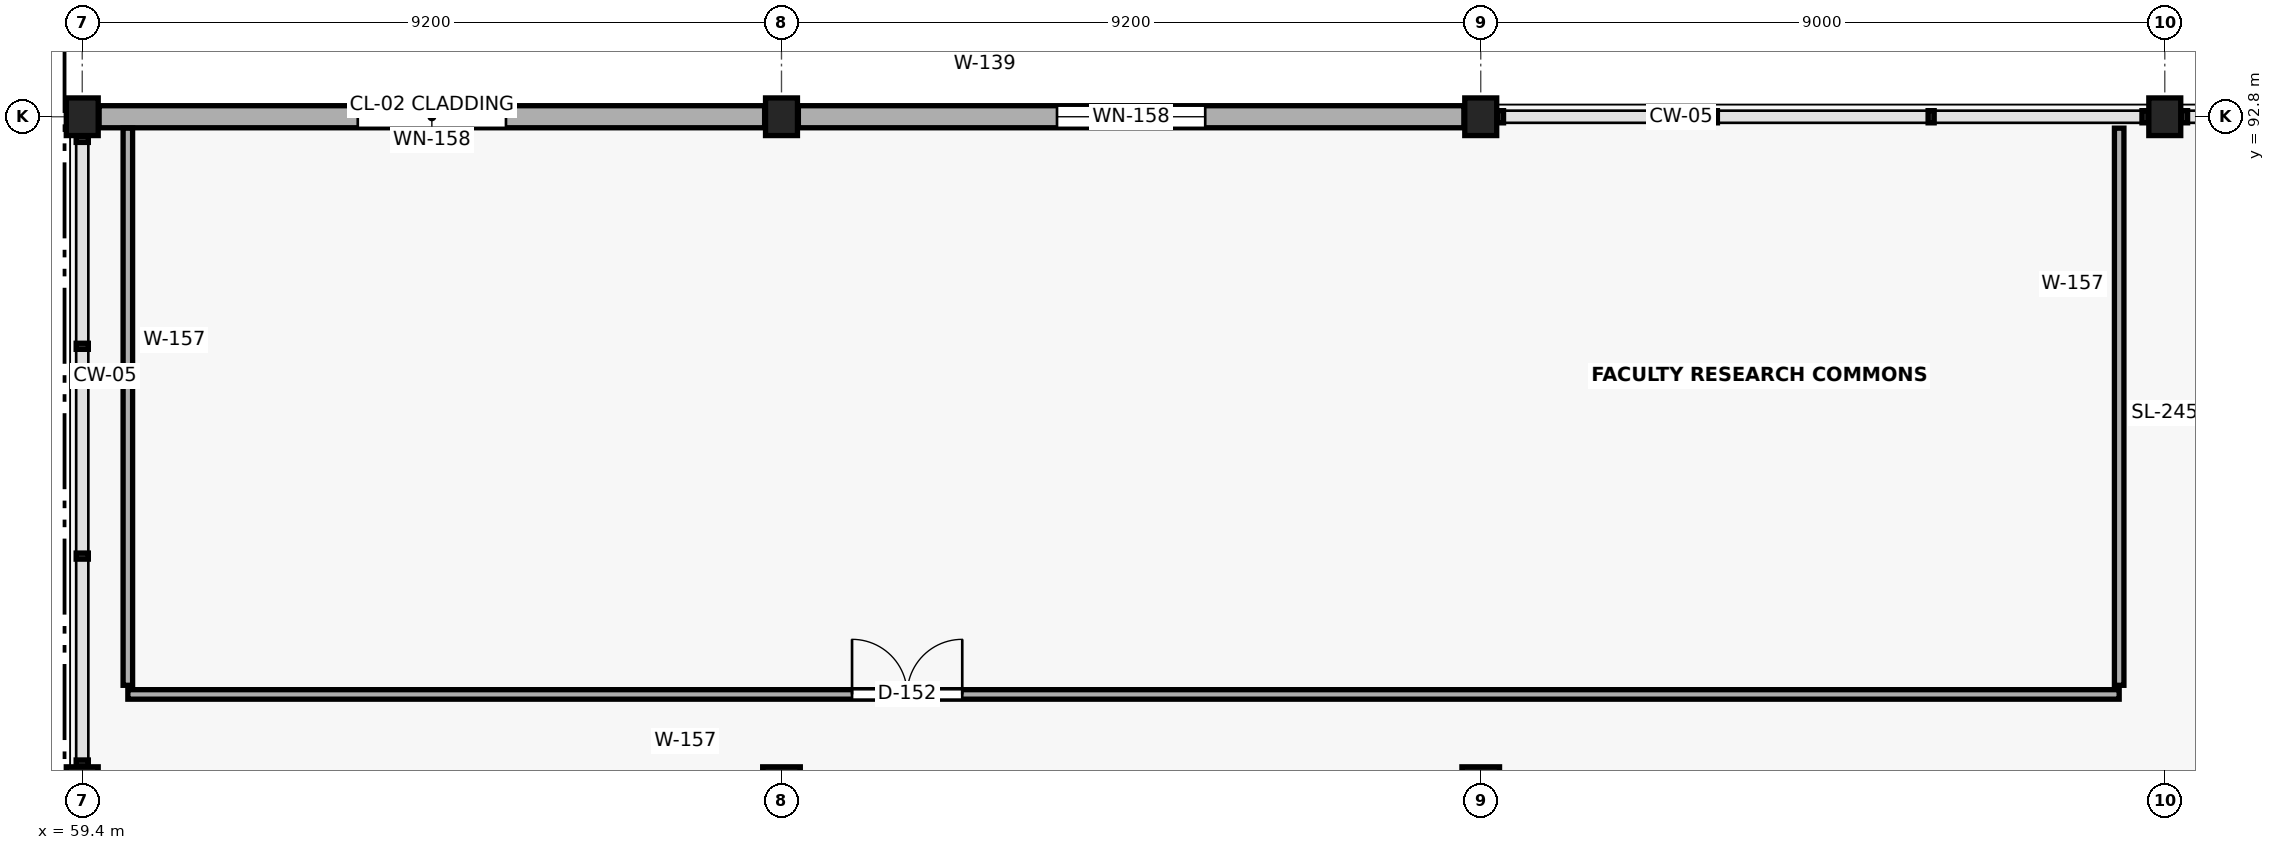
"""IFC4 building model, lengths in metres.
Left out: names, types, materials, properties, quantities, classifications, styles, units other than length and angle.
Written with IfcOpenShell. Run it as: python <this file> out.ifc"""

import sys

from ifc_helpers import new_model, si_unit, direction, frame, frame_2d, origin, origin_2d, place, context, subcontext, project, spatial, rectangle, extrude, element, fill, save


model = new_model("IFC4")
c1 = context("Model", 3, precision=1e-05, world=origin(), true_north=direction((0.0, 1.0)))
c2 = subcontext(c1, "Body", "Model", "MODEL_VIEW")
j1 = project(units=[si_unit("LENGTHUNIT", "METRE"), si_unit("PLANEANGLEUNIT", "RADIAN")], contexts=[c1])
p1 = place(None, origin())
s1 = spatial("IfcSite", under=j1, at=p1, CompositionType="ELEMENT")
p2 = place(p1, origin())
s2 = spatial("IfcBuilding", under=s1, at=p2, CompositionType="ELEMENT")
p3 = place(p2, frame((0.0, 0.0, 14.4)))
s3 = spatial("IfcBuildingStorey", under=s2, at=p3, CompositionType="ELEMENT", Elevation=14.4)
for number, where, z_axis, x_axis in (
    (1, (59.4, 84.0, 0.0), (0.0, 0.0, 1.0), (1.0, 0.0, 0.0)),
    (2, (59.4, 92.8, 0.0), (0.0, 0.0, 1.0), (1.0, 0.0, 0.0)),
):
    element("IfcColumn", number, at=place(p3, frame(where, z_axis=z_axis, x_axis=x_axis)), inside=s3, PredefinedType="COLUMN", context=c2, shape_type="SweptSolid", body=[
        extrude(rectangle(XDim=0.42, YDim=0.495, at=origin_2d()), origin(), (0.0, 0.0, 1.0), 3.9),
    ])
p4 = place(p3, frame((68.6, 84.0, 0.0), z_axis=(0.0, 0.0, 1.0), x_axis=(1.0, 0.0, 0.0)))
e3 = element("IfcColumn", 3, at=p4, inside=s3, PredefinedType="COLUMN", context=c2, shape_type="SweptSolid", body=[
    extrude(rectangle(XDim=0.495, YDim=0.495, at=origin_2d()), origin(), (0.0, 0.0, 1.0), 3.9),
])
p5 = place(p3, frame((68.6, 92.8, 0.0), z_axis=(0.0, 0.0, 1.0), x_axis=(1.0, 0.0, 0.0)))
e4 = element("IfcColumn", 4, at=p5, inside=s3, PredefinedType="COLUMN", context=c2, shape_type="SweptSolid", body=[
    extrude(rectangle(XDim=0.42, YDim=0.495, at=origin_2d()), origin(), (0.0, 0.0, 1.0), 3.9),
])
p6 = place(p3, frame((77.8, 84.0, 0.0), z_axis=(0.0, 0.0, 1.0), x_axis=(1.0, 0.0, 0.0)))
e5 = element("IfcColumn", 5, at=p6, inside=s3, PredefinedType="COLUMN", context=c2, shape_type="SweptSolid", body=[
    extrude(rectangle(XDim=0.495, YDim=0.495, at=origin_2d()), origin(), (0.0, 0.0, 1.0), 3.9),
])
for number, where, z_axis, x_axis in (
    (6, (77.8, 92.8, 0.0), (0.0, 0.0, 1.0), (1.0, 0.0, 0.0)),
    (7, (86.8, 92.8, 0.0), (0.0, 0.0, 1.0), (1.0, 0.0, 0.0)),
):
    element("IfcColumn", number, at=place(p3, frame(where, z_axis=z_axis, x_axis=x_axis)), inside=s3, PredefinedType="COLUMN", context=c2, shape_type="SweptSolid", body=[
        extrude(rectangle(XDim=0.42, YDim=0.495, at=origin_2d()), origin(), (0.0, 0.0, 1.0), 3.9),
    ])
p7 = place(p3, frame((59.622, 92.8, 0.0), z_axis=(0.0, 0.0, 1.0), x_axis=(1.0, 0.0, 0.0)))
e8 = element("IfcWall", 8, at=p7, inside=s3, PredefinedType="SOLIDWALL", context=c2, shape_type="SweptSolid", body=[
    extrude(rectangle(XDim=8.756, YDim=0.29, at=frame_2d((4.378, 0.0))), origin(), (0.0, 0.0, 1.0), 2.855),
])
p8 = place(p7, frame((3.403, 0.0, 0.85)))
e9 = element("IfcOpeningElement", 9, at=p8, cuts=e8, PredefinedType="OPENING", context=c2, shape_type="SweptSolid", body=[
    extrude(rectangle(XDim=1.95, YDim=1.9, at=frame_2d((0.975, 0.95))), frame((0.0, 0.157, 0.0), z_axis=(0.0, -1.0, 0.0), x_axis=(1.0, 0.0, 0.0)), (0.0, 0.0, 1.0), 0.314),
])
p9 = place(p3, frame((68.822, 92.8, 0.0), z_axis=(0.0, 0.0, 1.0), x_axis=(1.0, 0.0, 0.0)))
e10 = element("IfcWall", 10, at=p9, inside=s3, PredefinedType="SOLIDWALL", context=c2, shape_type="SweptSolid", body=[
    extrude(rectangle(XDim=8.756, YDim=0.29, at=frame_2d((4.378, 0.0))), origin(), (0.0, 0.0, 1.0), 2.855),
])
p10 = place(p9, frame((3.403, 0.0, 0.85)))
e11 = element("IfcOpeningElement", 11, at=p10, cuts=e10, PredefinedType="OPENING", context=c2, shape_type="SweptSolid", body=[
    extrude(rectangle(XDim=1.95, YDim=1.9, at=frame_2d((0.975, 0.95))), frame((0.0, 0.157, 0.0), z_axis=(0.0, -1.0, 0.0), x_axis=(1.0, 0.0, 0.0)), (0.0, 0.0, 1.0), 0.314),
])
p11 = place(p3, frame((60.0, 85.2, 0.0), z_axis=(0.0, 0.0, 1.0), x_axis=(1.0, 0.0, 0.0)))
e12 = element("IfcWall", 12, at=p11, inside=s3, PredefinedType="PARTITIONING", context=c2, shape_type="SweptSolid", body=[
    extrude(rectangle(XDim=26.2, YDim=0.125, at=frame_2d((13.1, 0.0))), origin(), (0.0, 0.0, 1.0), 3.655),
])
p12 = place(p11, frame((9.528, 0.0, 0.0)))
e13 = element("IfcOpeningElement", 13, at=p12, cuts=e12, PredefinedType="OPENING", context=c2, shape_type="SweptSolid", body=[
    extrude(rectangle(XDim=1.45, YDim=2.35, at=frame_2d((0.725, 1.175))), frame((0.0, 0.074, 0.0), z_axis=(0.0, -1.0, 0.0), x_axis=(1.0, 0.0, 0.0)), (0.0, 0.0, 1.0), 0.149),
])
for number, where, z_axis, x_axis in (
    (14, (86.2, 85.32, 0.0), (0.0, 0.0, 1.0), (0.0, 1.0, 0.0)),
    (15, (60.0, 92.65, 0.0), (0.0, 0.0, 1.0), (0.0, -1.0, 0.0)),
):
    element("IfcWall", number, at=place(p3, frame(where, z_axis=z_axis, x_axis=x_axis)), inside=s3, PredefinedType="PARTITIONING", context=c2, shape_type="SweptSolid", body=[
        extrude(rectangle(XDim=7.33, YDim=0.125, at=frame_2d((3.665, 0.0))), origin(), (0.0, 0.0, 1.0), 3.655),
    ])
p13 = place(p8, origin())
e16 = element("IfcWindow", 16, at=p13, inside=s3, PartitioningType="SINGLE_PANEL", PredefinedType="WINDOW", context=c2, shape_type="SweptSolid", body=[
    extrude(rectangle(XDim=1.95, YDim=1.9, at=frame_2d((0.975, 0.95))), frame((0.0, 0.03, 0.0), z_axis=(0.0, -1.0, 0.0), x_axis=(1.0, 0.0, 0.0)), (0.0, 0.0, 1.0), 0.06),
])
fill(e9, e16)
p14 = place(p10, origin())
e17 = element("IfcWindow", 17, at=p14, inside=s3, PartitioningType="SINGLE_PANEL", PredefinedType="WINDOW", context=c2, shape_type="SweptSolid", body=[
    extrude(rectangle(XDim=1.95, YDim=1.9, at=frame_2d((0.975, 0.95))), frame((0.0, 0.03, 0.0), z_axis=(0.0, -1.0, 0.0), x_axis=(1.0, 0.0, 0.0)), (0.0, 0.0, 1.0), 0.06),
])
fill(e11, e17)
p15 = place(p12, origin())
e18 = element("IfcDoor", 18, at=p15, inside=s3, OperationType="DOUBLE_DOOR_SINGLE_SWING", PredefinedType="DOOR", context=c2, shape_type="SweptSolid", body=[
    extrude(rectangle(XDim=1.45, YDim=2.35, at=frame_2d((0.725, 1.175))), frame((0.0, 0.025, 0.0), z_axis=(0.0, -1.0, 0.0), x_axis=(1.0, 0.0, 0.0)), (0.0, 0.0, 1.0), 0.05),
])
fill(e13, e18)
save(model, sys.argv[1])
